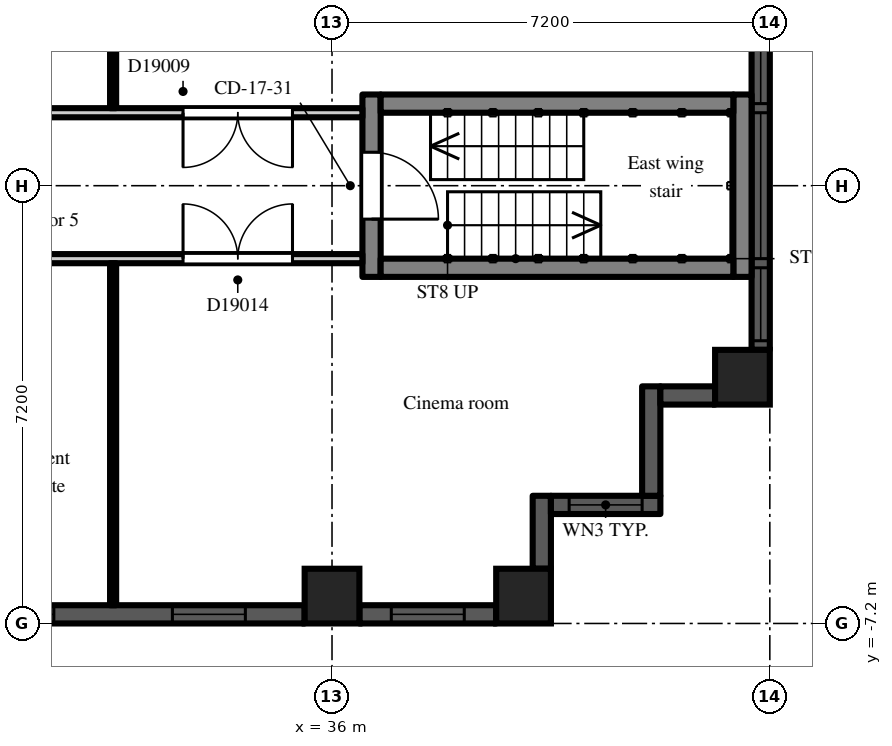
"""IFC4 building model, lengths in metres.
Left out: names, types, materials, properties, quantities, classifications, styles, units other than length and angle.
Written with IfcOpenShell. Run it as: python <this file> out.ifc"""

import sys

from ifc_helpers import new_model, si_unit, direction, frame, frame_2d, origin, origin_2d, place, context, subcontext, project, spatial, rectangle, extrude, element, fill, save


model = new_model("IFC4")
c1 = context("Model", 3, precision=1e-05, world=origin(), true_north=direction((0.0, 1.0)))
c2 = subcontext(c1, "Body", "Model", "MODEL_VIEW")
j1 = project(units=[si_unit("LENGTHUNIT", "METRE"), si_unit("PLANEANGLEUNIT", "RADIAN")], contexts=[c1])
p1 = place(None, origin())
s1 = spatial("IfcSite", under=j1, at=p1, CompositionType="ELEMENT")
p2 = place(p1, origin())
s2 = spatial("IfcBuilding", under=s1, at=p2, CompositionType="ELEMENT")
p3 = place(p2, frame((0.0, 0.0, 129.3)))
s3 = spatial("IfcBuildingStorey", under=s2, at=p3, CompositionType="ELEMENT", Elevation=129.3)
for number, where, z_axis, x_axis in (
    (1, (36.0, -6.75, 0.0), (0.0, 0.0, 1.0), (1.0, 0.0, 0.0)),
    (2, (39.15, -6.75, 0.0), (0.0, 0.0, 1.0), (1.0, 0.0, 0.0)),
    (3, (42.75, -3.15, 0.0), (0.0, 0.0, 1.0), (1.0, 0.0, 0.0)),
):
    element("IfcColumn", number, at=place(p3, frame(where, z_axis=z_axis, x_axis=x_axis)), inside=s3, PredefinedType="COLUMN", context=c2, shape_type="SweptSolid", body=[
        extrude(rectangle(XDim=0.9, YDim=0.9, at=origin_2d()), origin(), (0.0, 0.0, 1.0), 3.0),
    ])
p4 = place(p3, frame((29.25, -7.05, 0.0), z_axis=(0.0, 0.0, 1.0), x_axis=(1.0, 0.0, 0.0)))
e4 = element("IfcWall", 4, at=p4, inside=s3, PredefinedType="SOLIDWALL", context=c2, shape_type="SweptSolid", body=[
    extrude(rectangle(XDim=6.3, YDim=0.3, at=frame_2d((3.15, 0.0))), origin(), (0.0, 0.0, 1.0), 2.2),
])
p5 = place(p4, frame((0.975, 0.0, 0.2)))
e5 = element("IfcOpeningElement", 5, at=p5, cuts=e4, PredefinedType="OPENING", context=c2, shape_type="SweptSolid", body=[
    extrude(rectangle(XDim=1.2, YDim=1.85, at=frame_2d((0.6, 0.925))), frame((0.0, 0.16, 0.0), z_axis=(0.0, -1.0, 0.0), x_axis=(1.0, 0.0, 0.0)), (0.0, 0.0, 1.0), 0.32),
])
p6 = place(p4, frame((4.125, 0.0, 0.2)))
e6 = element("IfcOpeningElement", 6, at=p6, cuts=e4, PredefinedType="OPENING", context=c2, shape_type="SweptSolid", body=[
    extrude(rectangle(XDim=1.2, YDim=1.85, at=frame_2d((0.6, 0.925))), frame((0.0, 0.16, 0.0), z_axis=(0.0, -1.0, 0.0), x_axis=(1.0, 0.0, 0.0)), (0.0, 0.0, 1.0), 0.32),
])
p7 = place(p3, frame((36.45, -7.05, 0.0), z_axis=(0.0, 0.0, 1.0), x_axis=(1.0, 0.0, 0.0)))
e7 = element("IfcWall", 7, at=p7, inside=s3, PredefinedType="SOLIDWALL", context=c2, shape_type="SweptSolid", body=[
    extrude(rectangle(XDim=2.25, YDim=0.3, at=frame_2d((1.125, 0.0))), origin(), (0.0, 0.0, 1.0), 2.2),
])
p8 = place(p7, frame((0.525, 0.0, 0.2)))
e8 = element("IfcOpeningElement", 8, at=p8, cuts=e7, PredefinedType="OPENING", context=c2, shape_type="SweptSolid", body=[
    extrude(rectangle(XDim=1.2, YDim=1.85, at=frame_2d((0.6, 0.925))), frame((0.0, 0.16, 0.0), z_axis=(0.0, -1.0, 0.0), x_axis=(1.0, 0.0, 0.0)), (0.0, 0.0, 1.0), 0.32),
])
p9 = place(p3, frame((39.45, -6.3, 0.0), z_axis=(0.0, 0.0, 1.0), x_axis=(0.0, 1.0, 0.0)))
e9 = element("IfcWall", 9, at=p9, inside=s3, PredefinedType="SOLIDWALL", context=c2, shape_type="SweptSolid", body=[
    extrude(rectangle(XDim=1.2, YDim=0.3, at=frame_2d((0.6, 0.0))), origin(), (0.0, 0.0, 1.0), 2.6),
])
p10 = place(p3, frame((39.6, -5.25, 0.0), z_axis=(0.0, 0.0, 1.0), x_axis=(1.0, 0.0, 0.0)))
e10 = element("IfcWall", 10, at=p10, inside=s3, PredefinedType="SOLIDWALL", context=c2, shape_type="SweptSolid", body=[
    extrude(rectangle(XDim=1.8, YDim=0.3, at=frame_2d((0.9, 0.0))), origin(), (0.0, 0.0, 1.0), 2.6),
])
p11 = place(p10, frame((0.3, 0.0, 0.2)))
e11 = element("IfcOpeningElement", 11, at=p11, cuts=e10, PredefinedType="OPENING", context=c2, shape_type="SweptSolid", body=[
    extrude(rectangle(XDim=1.2, YDim=1.85, at=frame_2d((0.6, 0.925))), frame((0.0, 0.16, 0.0), z_axis=(0.0, -1.0, 0.0), x_axis=(1.0, 0.0, 0.0)), (0.0, 0.0, 1.0), 0.32),
])
p12 = place(p3, frame((41.25, -5.1, 0.0), z_axis=(0.0, 0.0, 1.0), x_axis=(0.0, 1.0, 0.0)))
e12 = element("IfcWall", 12, at=p12, inside=s3, PredefinedType="SOLIDWALL", context=c2, shape_type="SweptSolid", body=[
    extrude(rectangle(XDim=1.8, YDim=0.3, at=frame_2d((0.9, 0.0))), origin(), (0.0, 0.0, 1.0), 2.6),
])
p13 = place(p3, frame((41.4, -3.45, 0.0), z_axis=(0.0, 0.0, 1.0), x_axis=(1.0, 0.0, 0.0)))
e13 = element("IfcWall", 13, at=p13, inside=s3, PredefinedType="SOLIDWALL", context=c2, shape_type="SweptSolid", body=[
    extrude(rectangle(XDim=0.9, YDim=0.3, at=frame_2d((0.45, 0.0))), origin(), (0.0, 0.0, 1.0), 2.6),
])
p14 = place(p3, frame((43.05, -2.7, 0.0), z_axis=(0.0, 0.0, 1.0), x_axis=(0.0, 1.0, 0.0)))
e14 = element("IfcWall", 14, at=p14, inside=s3, PredefinedType="SOLIDWALL", context=c2, shape_type="SweptSolid", body=[
    extrude(rectangle(XDim=5.4, YDim=0.3, at=frame_2d((2.7, 0.0))), origin(), (0.0, 0.0, 1.0), 2.2),
])
p15 = place(p14, frame((1.5, 0.0, 0.2)))
e15 = element("IfcOpeningElement", 15, at=p15, cuts=e14, PredefinedType="OPENING", context=c2, shape_type="SweptSolid", body=[
    extrude(rectangle(XDim=2.4, YDim=1.85, at=frame_2d((1.2, 0.925))), frame((0.0, 0.16, 0.0), z_axis=(0.0, -1.0, 0.0), x_axis=(1.0, 0.0, 0.0)), (0.0, 0.0, 1.0), 0.32),
])
p16 = place(p14, frame((0.15, 0.0, 0.2)))
e16 = element("IfcOpeningElement", 16, at=p16, cuts=e14, PredefinedType="OPENING", context=c2, shape_type="SweptSolid", body=[
    extrude(rectangle(XDim=1.2, YDim=1.85, at=frame_2d((0.6, 0.925))), frame((0.0, 0.16, 0.0), z_axis=(0.0, -1.0, 0.0), x_axis=(1.0, 0.0, 0.0)), (0.0, 0.0, 1.0), 0.32),
])
p17 = place(p14, frame((4.05, 0.0, 0.2)))
e17 = element("IfcOpeningElement", 17, at=p17, cuts=e14, PredefinedType="OPENING", context=c2, shape_type="SweptSolid", body=[
    extrude(rectangle(XDim=1.2, YDim=1.85, at=frame_2d((0.6, 0.925))), frame((0.0, 0.16, 0.0), z_axis=(0.0, -1.0, 0.0), x_axis=(1.0, 0.0, 0.0)), (0.0, 0.0, 1.0), 0.32),
])
p18 = place(p3, frame((36.65, -1.5, 0.0), z_axis=(0.0, 0.0, 1.0), x_axis=(0.0, 1.0, 0.0)))
e18 = element("IfcWall", 18, at=p18, inside=s3, PredefinedType="SHEAR", context=c2, shape_type="SweptSolid", body=[
    extrude(rectangle(XDim=3.0, YDim=0.3, at=frame_2d((1.5, 0.0))), origin(), (0.0, 0.0, 1.0), 2.6),
])
p19 = place(p18, frame((0.95, 0.0, 0.0)))
e19 = element("IfcOpeningElement", 19, at=p19, cuts=e18, PredefinedType="OPENING", context=c2, shape_type="SweptSolid", body=[
    extrude(rectangle(XDim=1.1, YDim=2.1, at=frame_2d((0.55, 1.05))), frame((0.0, 0.16, 0.0), z_axis=(0.0, -1.0, 0.0), x_axis=(1.0, 0.0, 0.0)), (0.0, 0.0, 1.0), 0.32),
])
p20 = place(p3, frame((42.75, -1.5, 0.0), z_axis=(0.0, 0.0, 1.0), x_axis=(0.0, 1.0, 0.0)))
e20 = element("IfcWall", 20, at=p20, inside=s3, PredefinedType="SHEAR", context=c2, shape_type="SweptSolid", body=[
    extrude(rectangle(XDim=3.0, YDim=0.3, at=frame_2d((1.5, 0.0))), origin(), (0.0, 0.0, 1.0), 2.6),
])
for number, where, z_axis, x_axis in (
    (21, (36.8, -1.35, 0.0), (0.0, 0.0, 1.0), (1.0, 0.0, 0.0)),
    (22, (36.8, 1.35, 0.0), (0.0, 0.0, 1.0), (1.0, 0.0, 0.0)),
):
    element("IfcWall", number, at=place(p3, frame(where, z_axis=z_axis, x_axis=x_axis)), inside=s3, PredefinedType="SHEAR", context=c2, shape_type="SweptSolid", body=[
        extrude(rectangle(XDim=5.8, YDim=0.3, at=frame_2d((2.9, 0.0))), origin(), (0.0, 0.0, 1.0), 2.6),
    ])
p21 = place(p3, frame((21.6, -1.2, 0.0), z_axis=(0.0, 0.0, 1.0), x_axis=(1.0, 0.0, 0.0)))
e23 = element("IfcWall", 23, at=p21, inside=s3, PredefinedType="PARTITIONING", context=c2, shape_type="SweptSolid", body=[
    extrude(rectangle(XDim=14.9, YDim=0.15, at=frame_2d((7.45, 0.0))), origin(), (0.0, 0.0, 1.0), 2.6),
])
p22 = place(p21, frame((0.2, 0.0, 0.0)))
e24 = element("IfcOpeningElement", 24, at=p22, cuts=e23, PredefinedType="OPENING", context=c2, shape_type="SweptSolid", body=[
    extrude(rectangle(XDim=1.0, YDim=2.1, at=frame_2d((0.5, 1.05))), frame((0.0, 0.085, 0.0), z_axis=(0.0, -1.0, 0.0), x_axis=(1.0, 0.0, 0.0)), (0.0, 0.0, 1.0), 0.17),
])
p23 = place(p21, frame((5.71, 0.0, 0.0)))
e25 = element("IfcOpeningElement", 25, at=p23, cuts=e23, PredefinedType="OPENING", context=c2, shape_type="SweptSolid", body=[
    extrude(rectangle(XDim=1.0, YDim=2.1, at=frame_2d((0.5, 1.05))), frame((0.0, 0.085, 0.0), z_axis=(0.0, -1.0, 0.0), x_axis=(1.0, 0.0, 0.0)), (0.0, 0.0, 1.0), 0.17),
])
p24 = place(p21, frame((11.95, 0.0, 0.0)))
e26 = element("IfcOpeningElement", 26, at=p24, cuts=e23, PredefinedType="OPENING", context=c2, shape_type="SweptSolid", body=[
    extrude(rectangle(XDim=1.8, YDim=2.1, at=frame_2d((0.9, 1.05))), frame((0.0, 0.085, 0.0), z_axis=(0.0, -1.0, 0.0), x_axis=(1.0, 0.0, 0.0)), (0.0, 0.0, 1.0), 0.17),
])
p25 = place(p3, frame((21.6, 1.2, 0.0), z_axis=(0.0, 0.0, 1.0), x_axis=(1.0, 0.0, 0.0)))
e27 = element("IfcWall", 27, at=p25, inside=s3, PredefinedType="PARTITIONING", context=c2, shape_type="SweptSolid", body=[
    extrude(rectangle(XDim=14.9, YDim=0.15, at=frame_2d((7.45, 0.0))), origin(), (0.0, 0.0, 1.0), 2.6),
])
p26 = place(p25, frame((0.6, 0.0, 0.0)))
e28 = element("IfcOpeningElement", 28, at=p26, cuts=e27, PredefinedType="OPENING", context=c2, shape_type="SweptSolid", body=[
    extrude(rectangle(XDim=1.0, YDim=2.1, at=frame_2d((0.5, 1.05))), frame((0.0, 0.085, 0.0), z_axis=(0.0, -1.0, 0.0), x_axis=(1.0, 0.0, 0.0)), (0.0, 0.0, 1.0), 0.17),
])
p27 = place(p25, frame((6.3, 0.0, 0.0)))
e29 = element("IfcOpeningElement", 29, at=p27, cuts=e27, PredefinedType="OPENING", context=c2, shape_type="SweptSolid", body=[
    extrude(rectangle(XDim=1.8, YDim=2.1, at=frame_2d((0.9, 1.05))), frame((0.0, 0.085, 0.0), z_axis=(0.0, -1.0, 0.0), x_axis=(1.0, 0.0, 0.0)), (0.0, 0.0, 1.0), 0.17),
])
p28 = place(p25, frame((11.95, 0.0, 0.0)))
e30 = element("IfcOpeningElement", 30, at=p28, cuts=e27, PredefinedType="OPENING", context=c2, shape_type="SweptSolid", body=[
    extrude(rectangle(XDim=1.8, YDim=2.1, at=frame_2d((0.9, 1.05))), frame((0.0, 0.085, 0.0), z_axis=(0.0, -1.0, 0.0), x_axis=(1.0, 0.0, 0.0)), (0.0, 0.0, 1.0), 0.17),
])
for number, where, z_axis, x_axis in (
    (31, (32.4, -6.9, 0.0), (0.0, 0.0, 1.0), (0.0, 1.0, 0.0)),
    (32, (32.4, 1.275, 0.0), (0.0, 0.0, 1.0), (0.0, 1.0, 0.0)),
):
    element("IfcWall", number, at=place(p3, frame(where, z_axis=z_axis, x_axis=x_axis)), inside=s3, PredefinedType="PARTITIONING", context=c2, shape_type="SweptSolid", body=[
        extrude(rectangle(XDim=5.625, YDim=0.1, at=frame_2d((2.812, 0.0))), origin(), (0.0, 0.0, 1.0), 2.6),
    ])
p29 = place(p5, origin())
e33 = element("IfcWindow", 33, at=p29, inside=s3, PartitioningType="SINGLE_PANEL", PredefinedType="WINDOW", context=c2, shape_type="SweptSolid", body=[
    extrude(rectangle(XDim=1.2, YDim=1.85, at=frame_2d((0.6, 0.925))), frame((0.0, 0.03, 0.0), z_axis=(0.0, -1.0, 0.0), x_axis=(1.0, 0.0, 0.0)), (0.0, 0.0, 1.0), 0.06),
])
fill(e5, e33)
p30 = place(p6, origin())
e34 = element("IfcWindow", 34, at=p30, inside=s3, PartitioningType="SINGLE_PANEL", PredefinedType="WINDOW", context=c2, shape_type="SweptSolid", body=[
    extrude(rectangle(XDim=1.2, YDim=1.85, at=frame_2d((0.6, 0.925))), frame((0.0, 0.03, 0.0), z_axis=(0.0, -1.0, 0.0), x_axis=(1.0, 0.0, 0.0)), (0.0, 0.0, 1.0), 0.06),
])
fill(e6, e34)
p31 = place(p8, origin())
e35 = element("IfcWindow", 35, at=p31, inside=s3, PartitioningType="SINGLE_PANEL", PredefinedType="WINDOW", context=c2, shape_type="SweptSolid", body=[
    extrude(rectangle(XDim=1.2, YDim=1.85, at=frame_2d((0.6, 0.925))), frame((0.0, 0.03, 0.0), z_axis=(0.0, -1.0, 0.0), x_axis=(1.0, 0.0, 0.0)), (0.0, 0.0, 1.0), 0.06),
])
fill(e8, e35)
p32 = place(p11, origin())
e36 = element("IfcWindow", 36, at=p32, inside=s3, PartitioningType="SINGLE_PANEL", PredefinedType="WINDOW", context=c2, shape_type="SweptSolid", body=[
    extrude(rectangle(XDim=1.2, YDim=1.85, at=frame_2d((0.6, 0.925))), frame((0.0, 0.03, 0.0), z_axis=(0.0, -1.0, 0.0), x_axis=(1.0, 0.0, 0.0)), (0.0, 0.0, 1.0), 0.06),
])
fill(e11, e36)
p33 = place(p15, origin())
e37 = element("IfcWindow", 37, at=p33, inside=s3, PartitioningType="SINGLE_PANEL", PredefinedType="WINDOW", context=c2, shape_type="SweptSolid", body=[
    extrude(rectangle(XDim=2.4, YDim=1.85, at=frame_2d((1.2, 0.925))), frame((0.0, 0.03, 0.0), z_axis=(0.0, -1.0, 0.0), x_axis=(1.0, 0.0, 0.0)), (0.0, 0.0, 1.0), 0.06),
])
fill(e15, e37)
p34 = place(p16, origin())
e38 = element("IfcWindow", 38, at=p34, inside=s3, PartitioningType="SINGLE_PANEL", PredefinedType="WINDOW", context=c2, shape_type="SweptSolid", body=[
    extrude(rectangle(XDim=1.2, YDim=1.85, at=frame_2d((0.6, 0.925))), frame((0.0, 0.03, 0.0), z_axis=(0.0, -1.0, 0.0), x_axis=(1.0, 0.0, 0.0)), (0.0, 0.0, 1.0), 0.06),
])
fill(e16, e38)
p35 = place(p17, origin())
e39 = element("IfcWindow", 39, at=p35, inside=s3, PartitioningType="SINGLE_PANEL", PredefinedType="WINDOW", context=c2, shape_type="SweptSolid", body=[
    extrude(rectangle(XDim=1.2, YDim=1.85, at=frame_2d((0.6, 0.925))), frame((0.0, 0.03, 0.0), z_axis=(0.0, -1.0, 0.0), x_axis=(1.0, 0.0, 0.0)), (0.0, 0.0, 1.0), 0.06),
])
fill(e17, e39)
p36 = place(p19, frame((1.1, 0.0, 0.0), z_axis=(0.0, 0.0, 1.0), x_axis=(-1.0, 0.0, 0.0)))
e40 = element("IfcDoor", 40, at=p36, inside=s3, OperationType="SINGLE_SWING_RIGHT", PredefinedType="DOOR", context=c2, shape_type="SweptSolid", body=[
    extrude(rectangle(XDim=1.1, YDim=2.1, at=frame_2d((0.55, 1.05))), frame((0.0, 0.025, 0.0), z_axis=(0.0, -1.0, 0.0), x_axis=(1.0, 0.0, 0.0)), (0.0, 0.0, 1.0), 0.05),
])
fill(e19, e40)
p37 = place(p28, frame((1.8, 0.0, 0.0), z_axis=(0.0, 0.0, 1.0), x_axis=(-1.0, 0.0, 0.0)))
e41 = element("IfcDoor", 41, at=p37, inside=s3, OperationType="DOUBLE_DOOR_DOUBLE_SWING", PredefinedType="DOOR", context=c2, shape_type="SweptSolid", body=[
    extrude(rectangle(XDim=1.8, YDim=2.1, at=frame_2d((0.9, 1.05))), frame((0.0, 0.025, 0.0), z_axis=(0.0, -1.0, 0.0), x_axis=(1.0, 0.0, 0.0)), (0.0, 0.0, 1.0), 0.05),
])
fill(e30, e41)
p38 = place(p24, origin())
e42 = element("IfcDoor", 42, at=p38, inside=s3, OperationType="DOUBLE_DOOR_DOUBLE_SWING", PredefinedType="DOOR", context=c2, shape_type="SweptSolid", body=[
    extrude(rectangle(XDim=1.8, YDim=2.1, at=frame_2d((0.9, 1.05))), frame((0.0, 0.025, 0.0), z_axis=(0.0, -1.0, 0.0), x_axis=(1.0, 0.0, 0.0)), (0.0, 0.0, 1.0), 0.05),
])
fill(e26, e42)
save(model, sys.argv[1])
